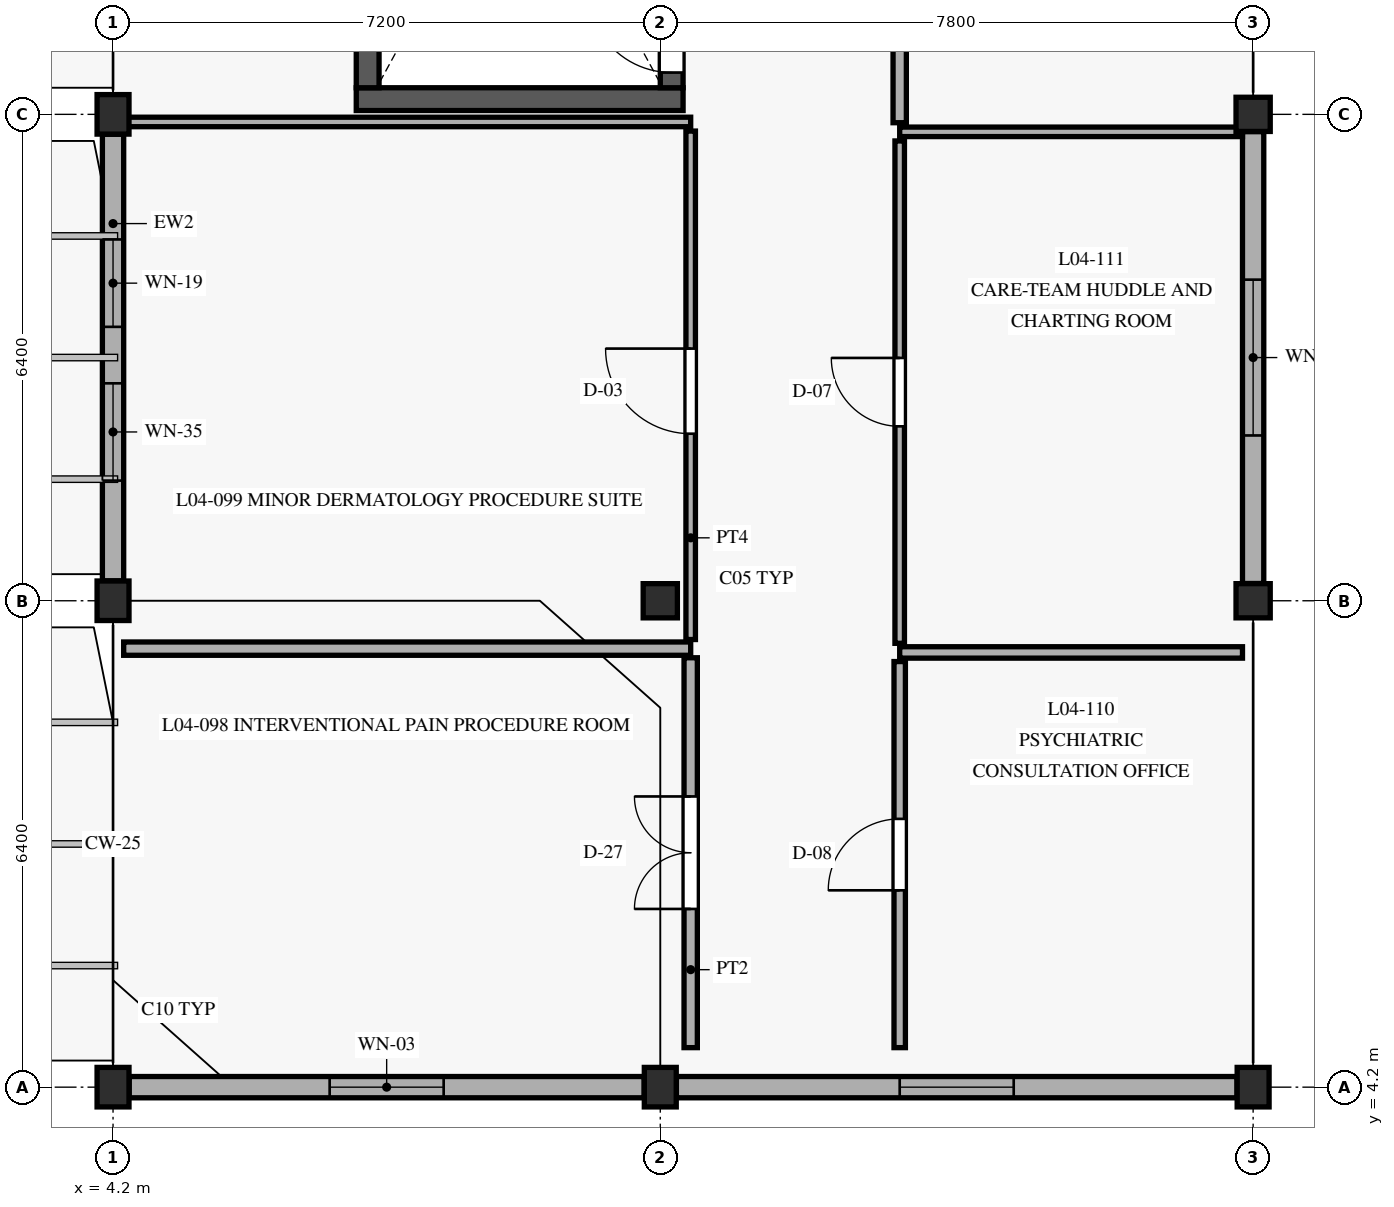
"""IFC4 building model, lengths in metres.
Left out: names, types, materials, properties, quantities, classifications, styles, units other than length and angle.
Written with IfcOpenShell. Run it as: python <this file> out.ifc"""

import sys

from ifc_helpers import new_model, si_unit, direction, frame, frame_2d, origin, origin_with_axes, origin_2d, place, context, subcontext, project, spatial, rectangle, extrude, element, fill, save


model = new_model("IFC4")
c1 = context("Model", 3, precision=1e-05, world=origin(), true_north=direction((0.0, 1.0)))
c2 = subcontext(c1, "Body", "Model", "MODEL_VIEW")
j1 = project(units=[si_unit("LENGTHUNIT", "METRE"), si_unit("PLANEANGLEUNIT", "RADIAN")], contexts=[c1])
p1 = place(None, origin())
s1 = spatial("IfcSite", under=j1, at=p1, CompositionType="ELEMENT")
p2 = place(p1, origin())
s2 = spatial("IfcBuilding", under=s1, at=p2, CompositionType="ELEMENT")
p3 = place(p2, frame((0.0, 0.0, 13.5)))
s3 = spatial("IfcBuildingStorey", under=s2, at=p3, CompositionType="ELEMENT", Elevation=13.5)
for number, where, z_axis, x_axis in (
    (1, (4.2, 4.2, 0.0), (0.0, 0.0, 1.0), (1.0, 0.0, 0.0)),
    (2, (4.2, 10.6, 0.0), (0.0, 0.0, 1.0), (1.0, 0.0, 0.0)),
    (3, (4.2, 17.0, 0.0), (0.0, 0.0, 1.0), (1.0, 0.0, 0.0)),
    (4, (11.4, 4.2, 0.0), (0.0, 0.0, 1.0), (1.0, 0.0, 0.0)),
):
    element("IfcColumn", number, at=place(p3, frame(where, z_axis=z_axis, x_axis=x_axis)), inside=s3, PredefinedType="COLUMN", context=c2, shape_type="SweptSolid", body=[
        extrude(rectangle(XDim=0.42, YDim=0.52, at=origin_2d()), origin(), (0.0, 0.0, 1.0), 4.05),
    ])
p4 = place(p3, frame((11.4, 10.6, 0.0), z_axis=(0.0, 0.0, 1.0), x_axis=(1.0, 0.0, 0.0)))
e5 = element("IfcColumn", 5, at=p4, inside=s3, PredefinedType="COLUMN", context=c2, shape_type="SweptSolid", body=[
    extrude(rectangle(XDim=0.45, YDim=0.45, at=origin_2d()), origin(), (0.0, 0.0, 1.0), 4.05),
])
p5 = place(p3, frame((19.2, 4.2, 0.0), z_axis=(0.0, 0.0, 1.0), x_axis=(1.0, 0.0, 0.0)))
e6 = element("IfcColumn", 6, at=p5, inside=s3, PredefinedType="COLUMN", context=c2, shape_type="SweptSolid", body=[
    extrude(rectangle(XDim=0.42, YDim=0.52, at=origin_2d()), origin(), (0.0, 0.0, 1.0), 4.05),
])
for number, where, z_axis, x_axis in (
    (7, (19.2, 10.6, 0.0), (0.0, 0.0, 1.0), (1.0, 0.0, 0.0)),
    (8, (19.2, 17.0, 0.0), (0.0, 0.0, 1.0), (1.0, 0.0, 0.0)),
):
    element("IfcColumn", number, at=place(p3, frame(where, z_axis=z_axis, x_axis=x_axis)), inside=s3, PredefinedType="COLUMN", context=c2, shape_type="SweptSolid", body=[
        extrude(rectangle(XDim=0.45, YDim=0.45, at=origin_2d()), origin(), (0.0, 0.0, 1.0), 4.05),
    ])
p6 = place(p3, frame((7.4, 17.2, 0.0), z_axis=(0.0, 0.0, 1.0), x_axis=(1.0, 0.0, 0.0)))
e9 = element("IfcWall", 9, at=p6, inside=s3, PredefinedType="SHEAR", context=c2, shape_type="SweptSolid", body=[
    extrude(rectangle(XDim=4.3, YDim=0.3, at=frame_2d((2.15, 0.0))), origin(), (0.0, 0.0, 1.0), 3.75),
])
p7 = place(p3, frame((7.55, 29.05, 0.0), z_axis=(0.0, 0.0, 1.0), x_axis=(0.0, -1.0, 0.0)))
e10 = element("IfcWall", 10, at=p7, inside=s3, PredefinedType="SHEAR", context=c2, shape_type="SweptSolid", body=[
    extrude(rectangle(XDim=11.7, YDim=0.3, at=frame_2d((5.85, 0.0))), origin(), (0.0, 0.0, 1.0), 3.75),
])
p8 = place(p3, frame((11.55, 17.35, 0.0), z_axis=(0.0, 0.0, 1.0), x_axis=(0.0, 1.0, 0.0)))
e11 = element("IfcWall", 11, at=p8, inside=s3, PredefinedType="SHEAR", context=c2, shape_type="SweptSolid", body=[
    extrude(rectangle(XDim=11.7, YDim=0.3, at=frame_2d((5.85, 0.0))), origin(), (0.0, 0.0, 1.0), 3.75),
])
p9 = place(p8, frame((0.2, 0.0, 0.0)))
e12 = element("IfcOpeningElement", 12, at=p9, cuts=e11, PredefinedType="OPENING", context=c2, shape_type="SweptSolid", body=[
    extrude(rectangle(XDim=1.1, YDim=2.2, at=frame_2d((0.55, 1.1))), frame((0.0, 0.16, 0.0), z_axis=(0.0, -1.0, 0.0), x_axis=(1.0, 0.0, 0.0)), (0.0, 0.0, 1.0), 0.32),
])
p10 = place(p8, frame((7.875, 0.0, 0.0)))
e13 = element("IfcOpeningElement", 13, at=p10, cuts=e11, PredefinedType="OPENING", context=c2, shape_type="SweptSolid", body=[
    extrude(rectangle(XDim=1.15, YDim=2.2, at=frame_2d((0.575, 1.1))), frame((0.0, 0.16, 0.0), z_axis=(0.0, -1.0, 0.0), x_axis=(1.0, 0.0, 0.0)), (0.0, 0.0, 1.0), 0.32),
])
p11 = place(p8, frame((10.14, 0.0, 0.0)))
e14 = element("IfcOpeningElement", 14, at=p11, cuts=e11, PredefinedType="OPENING", context=c2, shape_type="SweptSolid", body=[
    extrude(rectangle(XDim=1.02, YDim=2.15, at=frame_2d((0.51, 1.075))), frame((0.0, 0.16, 0.0), z_axis=(0.0, -1.0, 0.0), x_axis=(1.0, 0.0, 0.0)), (0.0, 0.0, 1.0), 0.32),
])
p12 = place(p3, frame((4.2, 16.738, 0.0), z_axis=(0.0, 0.0, 1.0), x_axis=(0.0, -1.0, 0.0)))
e15 = element("IfcWall", 15, at=p12, inside=s3, PredefinedType="SOLIDWALL", context=c2, shape_type="SweptSolid", body=[
    extrude(rectangle(XDim=5.876, YDim=0.28, at=frame_2d((2.938, 0.0))), origin(), (0.0, 0.0, 1.0), 3.33),
])
p13 = place(p12, frame((1.384, 0.0, 0.88)))
e16 = element("IfcOpeningElement", 16, at=p13, cuts=e15, PredefinedType="OPENING", context=c2, shape_type="SweptSolid", body=[
    extrude(rectangle(XDim=1.15, YDim=1.65, at=frame_2d((0.575, 0.825))), frame((0.0, 0.15, 0.0), z_axis=(0.0, -1.0, 0.0), x_axis=(1.0, 0.0, 0.0)), (0.0, 0.0, 1.0), 0.3),
])
p14 = place(p12, frame((3.277, 0.0, 0.88)))
e17 = element("IfcOpeningElement", 17, at=p14, cuts=e15, PredefinedType="OPENING", context=c2, shape_type="SweptSolid", body=[
    extrude(rectangle(XDim=1.28, YDim=1.95, at=frame_2d((0.64, 0.975))), frame((0.0, 0.15, 0.0), z_axis=(0.0, -1.0, 0.0), x_axis=(1.0, 0.0, 0.0)), (0.0, 0.0, 1.0), 0.3),
])
p15 = place(p3, frame((19.2, 10.827, 0.0), z_axis=(0.0, 0.0, 1.0), x_axis=(0.0, 1.0, 0.0)))
e18 = element("IfcWall", 18, at=p15, inside=s3, PredefinedType="SOLIDWALL", context=c2, shape_type="SweptSolid", body=[
    extrude(rectangle(XDim=5.946, YDim=0.28, at=frame_2d((2.973, 0.0))), origin(), (0.0, 0.0, 1.0), 3.42),
])
p16 = place(p15, frame((1.948, 0.0, 0.8)))
e19 = element("IfcOpeningElement", 19, at=p16, cuts=e18, PredefinedType="OPENING", context=c2, shape_type="SweptSolid", body=[
    extrude(rectangle(XDim=2.05, YDim=1.95, at=frame_2d((1.025, 0.975))), frame((0.0, 0.15, 0.0), z_axis=(0.0, -1.0, 0.0), x_axis=(1.0, 0.0, 0.0)), (0.0, 0.0, 1.0), 0.3),
])
p17 = place(p3, frame((4.412, 4.2, 0.0), z_axis=(0.0, 0.0, 1.0), x_axis=(1.0, 0.0, 0.0)))
e20 = element("IfcWall", 20, at=p17, inside=s3, PredefinedType="SOLIDWALL", context=c2, shape_type="SweptSolid", body=[
    extrude(rectangle(XDim=6.776, YDim=0.28, at=frame_2d((3.388, 0.0))), origin(), (0.0, 0.0, 1.0), 3.25),
])
p18 = place(p17, frame((2.638, 0.0, 0.83)))
e21 = element("IfcOpeningElement", 21, at=p18, cuts=e20, PredefinedType="OPENING", context=c2, shape_type="SweptSolid", body=[
    extrude(rectangle(XDim=1.5, YDim=2.2, at=frame_2d((0.75, 1.1))), frame((0.0, 0.15, 0.0), z_axis=(0.0, -1.0, 0.0), x_axis=(1.0, 0.0, 0.0)), (0.0, 0.0, 1.0), 0.3),
])
p19 = place(p3, frame((11.612, 4.2, 0.0), z_axis=(0.0, 0.0, 1.0), x_axis=(1.0, 0.0, 0.0)))
e22 = element("IfcWall", 22, at=p19, inside=s3, PredefinedType="SOLIDWALL", context=c2, shape_type="SweptSolid", body=[
    extrude(rectangle(XDim=7.376, YDim=0.28, at=frame_2d((3.688, 0.0))), origin(), (0.0, 0.0, 1.0), 3.25),
])
p20 = place(p19, frame((2.938, 0.0, 0.83)))
e23 = element("IfcOpeningElement", 23, at=p20, cuts=e22, PredefinedType="OPENING", context=c2, shape_type="SweptSolid", body=[
    extrude(rectangle(XDim=1.5, YDim=2.2, at=frame_2d((0.75, 1.1))), frame((0.0, 0.15, 0.0), z_axis=(0.0, -1.0, 0.0), x_axis=(1.0, 0.0, 0.0)), (0.0, 0.0, 1.0), 0.3),
])
p21 = place(p3, frame((11.8, 4.72, 0.0), z_axis=(0.0, 0.0, 1.0), x_axis=(0.0, 1.0, 0.0)))
e24 = element("IfcWall", 24, at=p21, inside=s3, PredefinedType="PARTITIONING", context=c2, shape_type="SweptSolid", body=[
    extrude(rectangle(XDim=5.13, YDim=0.175, at=frame_2d((2.565, 0.0))), origin(), (0.0, 0.0, 1.0), 3.745),
])
p22 = place(p21, frame((1.825, 0.0, 0.0)))
e25 = element("IfcOpeningElement", 25, at=p22, cuts=e24, PredefinedType="OPENING", context=c2, shape_type="SweptSolid", body=[
    extrude(rectangle(XDim=1.48, YDim=2.28, at=frame_2d((0.74, 1.14))), frame((0.0, 0.098, 0.0), z_axis=(0.0, -1.0, 0.0), x_axis=(1.0, 0.0, 0.0)), (0.0, 0.0, 1.0), 0.195),
])
p23 = place(p3, frame((4.34, 9.97, 0.0), z_axis=(0.0, 0.0, 1.0), x_axis=(1.0, 0.0, 0.0)))
e26 = element("IfcWall", 26, at=p23, inside=s3, PredefinedType="PARTITIONING", context=c2, shape_type="SweptSolid", body=[
    extrude(rectangle(XDim=7.46, YDim=0.175, at=frame_2d((3.73, 0.0))), origin(), (0.0, 0.0, 1.0), 3.325),
])
p24 = place(p3, frame((11.8, 10.09, 0.0), z_axis=(0.0, 0.0, 1.0), x_axis=(0.0, 1.0, 0.0)))
e27 = element("IfcWall", 27, at=p24, inside=s3, PredefinedType="PARTITIONING", context=c2, shape_type="SweptSolid", body=[
    extrude(rectangle(XDim=6.69, YDim=0.125, at=frame_2d((3.345, 0.0))), origin(), (0.0, 0.0, 1.0), 3.345),
])
p25 = place(p24, frame((2.708, 0.0, 0.0)))
e28 = element("IfcOpeningElement", 28, at=p25, cuts=e27, PredefinedType="OPENING", context=c2, shape_type="SweptSolid", body=[
    extrude(rectangle(XDim=1.12, YDim=2.2, at=frame_2d((0.56, 1.1))), frame((0.0, 0.073, 0.0), z_axis=(0.0, -1.0, 0.0), x_axis=(1.0, 0.0, 0.0)), (0.0, 0.0, 1.0), 0.145),
])
p26 = place(p3, frame((4.34, 16.9, 0.0), z_axis=(0.0, 0.0, 1.0), x_axis=(1.0, 0.0, 0.0)))
e29 = element("IfcWall", 29, at=p26, inside=s3, PredefinedType="PARTITIONING", context=c2, shape_type="SweptSolid", body=[
    extrude(rectangle(XDim=7.46, YDim=0.125, at=frame_2d((3.73, 0.0))), origin(), (0.0, 0.0, 1.0), 3.345),
])
p27 = place(p3, frame((14.55, 4.72, 0.0), z_axis=(0.0, 0.0, 1.0), x_axis=(0.0, 1.0, 0.0)))
e30 = element("IfcWall", 30, at=p27, inside=s3, PredefinedType="PARTITIONING", context=c2, shape_type="SweptSolid", body=[
    extrude(rectangle(XDim=5.08, YDim=0.15, at=frame_2d((2.54, 0.0))), origin(), (0.0, 0.0, 1.0), 3.745),
])
p28 = place(p27, frame((2.07, 0.0, 0.0)))
e31 = element("IfcOpeningElement", 31, at=p28, cuts=e30, PredefinedType="OPENING", context=c2, shape_type="SweptSolid", body=[
    extrude(rectangle(XDim=0.94, YDim=2.18, at=frame_2d((0.47, 1.09))), frame((0.0, 0.085, 0.0), z_axis=(0.0, -1.0, 0.0), x_axis=(1.0, 0.0, 0.0)), (0.0, 0.0, 1.0), 0.17),
])
p29 = place(p3, frame((14.55, 9.92, 0.0), z_axis=(0.0, 0.0, 1.0), x_axis=(1.0, 0.0, 0.0)))
e32 = element("IfcWall", 32, at=p29, inside=s3, PredefinedType="PARTITIONING", context=c2, shape_type="SweptSolid", body=[
    extrude(rectangle(XDim=4.51, YDim=0.15, at=frame_2d((2.255, 0.0))), origin(), (0.0, 0.0, 1.0), 3.415),
])
p30 = place(p3, frame((14.55, 10.04, 0.0), z_axis=(0.0, 0.0, 1.0), x_axis=(0.0, 1.0, 0.0)))
e33 = element("IfcWall", 33, at=p30, inside=s3, PredefinedType="PARTITIONING", context=c2, shape_type="SweptSolid", body=[
    extrude(rectangle(XDim=6.61, YDim=0.125, at=frame_2d((3.305, 0.0))), origin(), (0.0, 0.0, 1.0), 3.345),
])
p31 = place(p30, frame((2.855, 0.0, 0.0)))
e34 = element("IfcOpeningElement", 34, at=p31, cuts=e33, PredefinedType="OPENING", context=c2, shape_type="SweptSolid", body=[
    extrude(rectangle(XDim=0.9, YDim=2.12, at=frame_2d((0.45, 1.06))), frame((0.0, 0.073, 0.0), z_axis=(0.0, -1.0, 0.0), x_axis=(1.0, 0.0, 0.0)), (0.0, 0.0, 1.0), 0.145),
])
p32 = place(p3, frame((14.55, 16.77, 0.0), z_axis=(0.0, 0.0, 1.0), x_axis=(1.0, 0.0, 0.0)))
e35 = element("IfcWall", 35, at=p32, inside=s3, PredefinedType="PARTITIONING", context=c2, shape_type="SweptSolid", body=[
    extrude(rectangle(XDim=4.51, YDim=0.125, at=frame_2d((2.255, 0.0))), origin(), (0.0, 0.0, 1.0), 3.345),
])
p33 = place(p3, frame((14.55, 16.89, 0.0), z_axis=(0.0, 0.0, 1.0), x_axis=(0.0, 1.0, 0.0)))
e36 = element("IfcWall", 36, at=p33, inside=s3, PredefinedType="PARTITIONING", context=c2, shape_type="SweptSolid", body=[
    extrude(rectangle(XDim=7.32, YDim=0.175, at=frame_2d((3.66, 0.0))), origin(), (0.0, 0.0, 1.0), 3.345),
])
p34 = place(p33, frame((3.13, 0.0, 0.0)))
e37 = element("IfcOpeningElement", 37, at=p34, cuts=e36, PredefinedType="OPENING", context=c2, shape_type="SweptSolid", body=[
    extrude(rectangle(XDim=1.06, YDim=2.2, at=frame_2d((0.53, 1.1))), frame((0.0, 0.098, 0.0), z_axis=(0.0, -1.0, 0.0), x_axis=(1.0, 0.0, 0.0)), (0.0, 0.0, 1.0), 0.195),
])
p35 = place(p9, origin_with_axes())
e38 = element("IfcDoor", 38, at=p35, inside=s3, OperationType="SINGLE_SWING_RIGHT", PredefinedType="DOOR", context=c2, shape_type="SweptSolid", body=[
    extrude(rectangle(XDim=1.1, YDim=2.2, at=frame_2d((0.55, 1.1))), frame((0.0, 0.025, 0.0), z_axis=(0.0, -1.0, 0.0), x_axis=(1.0, 0.0, 0.0)), (0.0, 0.0, 1.0), 0.05),
])
fill(e12, e38)
p36 = place(p13, origin_with_axes())
e39 = element("IfcWindow", 39, at=p36, inside=s3, PartitioningType="SINGLE_PANEL", PredefinedType="WINDOW", context=c2, shape_type="SweptSolid", body=[
    extrude(rectangle(XDim=1.15, YDim=1.65, at=frame_2d((0.575, 0.825))), frame((0.0, 0.03, 0.0), z_axis=(0.0, -1.0, 0.0), x_axis=(1.0, 0.0, 0.0)), (0.0, 0.0, 1.0), 0.06),
])
fill(e16, e39)
p37 = place(p14, origin_with_axes())
e40 = element("IfcWindow", 40, at=p37, inside=s3, PartitioningType="SINGLE_PANEL", PredefinedType="WINDOW", context=c2, shape_type="SweptSolid", body=[
    extrude(rectangle(XDim=1.28, YDim=1.95, at=frame_2d((0.64, 0.975))), frame((0.0, 0.03, 0.0), z_axis=(0.0, -1.0, 0.0), x_axis=(1.0, 0.0, 0.0)), (0.0, 0.0, 1.0), 0.06),
])
fill(e17, e40)
p38 = place(p16, origin_with_axes())
e41 = element("IfcWindow", 41, at=p38, inside=s3, PartitioningType="SINGLE_PANEL", PredefinedType="WINDOW", context=c2, shape_type="SweptSolid", body=[
    extrude(rectangle(XDim=2.05, YDim=1.95, at=frame_2d((1.025, 0.975))), frame((0.0, 0.03, 0.0), z_axis=(0.0, -1.0, 0.0), x_axis=(1.0, 0.0, 0.0)), (0.0, 0.0, 1.0), 0.06),
])
fill(e19, e41)
p39 = place(p18, origin_with_axes())
e42 = element("IfcWindow", 42, at=p39, inside=s3, PartitioningType="SINGLE_PANEL", PredefinedType="WINDOW", context=c2, shape_type="SweptSolid", body=[
    extrude(rectangle(XDim=1.5, YDim=2.2, at=frame_2d((0.75, 1.1))), frame((0.0, 0.03, 0.0), z_axis=(0.0, -1.0, 0.0), x_axis=(1.0, 0.0, 0.0)), (0.0, 0.0, 1.0), 0.06),
])
fill(e21, e42)
p40 = place(p20, origin_with_axes())
e43 = element("IfcWindow", 43, at=p40, inside=s3, PartitioningType="SINGLE_PANEL", PredefinedType="WINDOW", context=c2, shape_type="SweptSolid", body=[
    extrude(rectangle(XDim=1.5, YDim=2.2, at=frame_2d((0.75, 1.1))), frame((0.0, 0.03, 0.0), z_axis=(0.0, -1.0, 0.0), x_axis=(1.0, 0.0, 0.0)), (0.0, 0.0, 1.0), 0.06),
])
fill(e23, e43)
p41 = place(p22, origin_with_axes())
e44 = element("IfcDoor", 44, at=p41, inside=s3, OperationType="DOUBLE_DOOR_SINGLE_SWING", PredefinedType="DOOR", context=c2, shape_type="SweptSolid", body=[
    extrude(rectangle(XDim=1.48, YDim=2.28, at=frame_2d((0.74, 1.14))), frame((0.0, 0.025, 0.0), z_axis=(0.0, -1.0, 0.0), x_axis=(1.0, 0.0, 0.0)), (0.0, 0.0, 1.0), 0.05),
])
fill(e25, e44)
p42 = place(p25, origin_with_axes())
e45 = element("IfcDoor", 45, at=p42, inside=s3, OperationType="SINGLE_SWING_RIGHT", PredefinedType="DOOR", context=c2, shape_type="SweptSolid", body=[
    extrude(rectangle(XDim=1.12, YDim=2.2, at=frame_2d((0.56, 1.1))), frame((0.0, 0.025, 0.0), z_axis=(0.0, -1.0, 0.0), x_axis=(1.0, 0.0, 0.0)), (0.0, 0.0, 1.0), 0.05),
])
fill(e28, e45)
p43 = place(p28, frame((0.94, 0.0, 0.0), z_axis=(0.0, 0.0, 1.0), x_axis=(-1.0, 0.0, 0.0)))
e46 = element("IfcDoor", 46, at=p43, inside=s3, OperationType="SINGLE_SWING_RIGHT", PredefinedType="DOOR", context=c2, shape_type="SweptSolid", body=[
    extrude(rectangle(XDim=0.94, YDim=2.18, at=frame_2d((0.47, 1.09))), frame((0.0, 0.025, 0.0), z_axis=(0.0, -1.0, 0.0), x_axis=(1.0, 0.0, 0.0)), (0.0, 0.0, 1.0), 0.05),
])
fill(e31, e46)
p44 = place(p31, frame((0.9, 0.0, 0.0), z_axis=(0.0, 0.0, 1.0), x_axis=(-1.0, 0.0, 0.0)))
e47 = element("IfcDoor", 47, at=p44, inside=s3, OperationType="SINGLE_SWING_LEFT", PredefinedType="DOOR", context=c2, shape_type="SweptSolid", body=[
    extrude(rectangle(XDim=0.9, YDim=2.12, at=frame_2d((0.45, 1.06))), frame((0.0, 0.025, 0.0), z_axis=(0.0, -1.0, 0.0), x_axis=(1.0, 0.0, 0.0)), (0.0, 0.0, 1.0), 0.05),
])
fill(e34, e47)
save(model, sys.argv[1])
